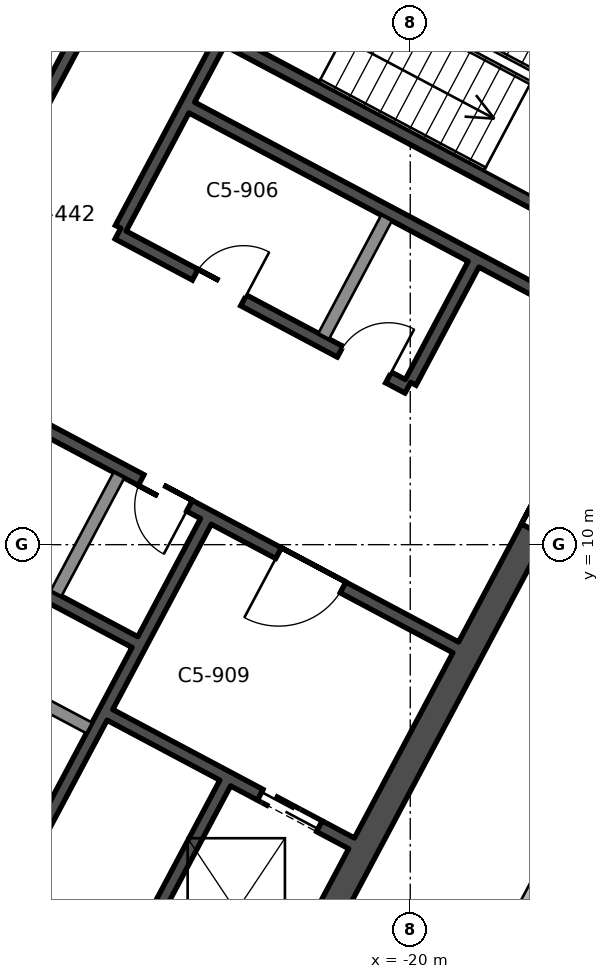
"""IFC4 building model, lengths in metres.
Left out: names, types, materials, properties, quantities, classifications, styles, units other than length and angle.
Written with IfcOpenShell. Run it as: python <this file> out.ifc"""

import sys

from ifc_helpers import new_model, si_unit, direction, frame, frame_2d, origin, place, context, subcontext, project, spatial, rectangle, extrude, element, fill, save


model = new_model("IFC4")
c1 = context("Model", 3, precision=1e-05, world=origin(), true_north=direction((0.0, 1.0)))
c2 = subcontext(c1, "Body", "Model", "MODEL_VIEW")
j1 = project(units=[si_unit("LENGTHUNIT", "METRE"), si_unit("PLANEANGLEUNIT", "RADIAN")], contexts=[c1])
p1 = place(None, origin())
s1 = spatial("IfcSite", under=j1, at=p1, CompositionType="ELEMENT")
p2 = place(p1, origin())
s2 = spatial("IfcBuilding", under=s1, at=p2, CompositionType="ELEMENT")
p3 = place(p2, frame((0.0, 0.0, 345.0)))
s3 = spatial("IfcBuildingStorey", under=s2, at=p3, CompositionType="ELEMENT", Elevation=345.0)
p4 = place(p3, frame((-13.771, 18.138, 0.0), z_axis=(0.0, 0.0, 1.0), x_axis=(-0.469467968382, -0.882949504028, 0.0)))
e1 = element("IfcWall", 1, at=p4, inside=s3, PredefinedType="SHEAR", context=c2, shape_type="SweptSolid", body=[
    extrude(rectangle(XDim=19.1, YDim=0.45, at=frame_2d((9.55, 0.0))), origin(), (0.0, 0.0, 1.0), 4.2),
])
p5 = place(p4, frame((6.55, 0.0, 0.0)))
e2 = element("IfcOpeningElement", 2, at=p5, cuts=e1, PredefinedType="OPENING", context=c2, shape_type="SweptSolid", body=[
    extrude(rectangle(XDim=2.4, YDim=2.4, at=frame_2d((1.2, 1.2))), frame((0.0, 0.235, 0.0), z_axis=(0.0, -1.0, 0.0), x_axis=(1.0, 0.0, 0.0)), (0.0, 0.0, 1.0), 0.47),
])
p6 = place(p3, frame((-14.076, 18.045, 0.0), z_axis=(0.0, 0.0, 1.0), x_axis=(-0.882947755831, 0.46947125628, 0.0)))
e3 = element("IfcWall", 3, at=p6, inside=s3, PredefinedType="SHEAR", context=c2, shape_type="SweptSolid", body=[
    extrude(rectangle(XDim=20.2, YDim=0.45, at=frame_2d((10.1, 0.0))), origin(), (0.0, 0.0, 1.0), 4.2),
])
p7 = place(p3, frame((-22.832, 1.578, 0.0), z_axis=(0.0, 0.0, 1.0), x_axis=(-0.88294509198, 0.469476266226, 0.0)))
e4 = element("IfcWall", 4, at=p7, inside=s3, PredefinedType="SHEAR", context=c2, shape_type="SweptSolid", body=[
    extrude(rectangle(XDim=20.2, YDim=0.45, at=frame_2d((10.1, 0.0))), origin(), (0.0, 0.0, 1.0), 4.2),
])
p8 = place(p3, frame((-23.043, 6.08, 0.0), z_axis=(0.0, 0.0, 1.0), x_axis=(-0.469494272526, -0.882935517501, 0.0)))
e5 = element("IfcWall", 5, at=p8, inside=s3, PredefinedType="SHEAR", context=c2, shape_type="SweptSolid", body=[
    extrude(rectangle(XDim=3.65, YDim=0.2, at=frame_2d((1.825, 0.0))), origin(), (0.0, 0.0, 1.0), 4.2),
])
p9 = place(p3, frame((-18.96, 14.611, 0.0), z_axis=(0.0, 0.0, 1.0), x_axis=(-0.4694473164, -0.882960484464, 0.0)))
e6 = element("IfcWall", 6, at=p9, inside=s3, PredefinedType="SHEAR", context=c2, shape_type="SweptSolid", body=[
    extrude(rectangle(XDim=2.2, YDim=0.2, at=frame_2d((1.1, 0.0))), origin(), (0.0, 0.0, 1.0), 4.2),
])
p10 = place(p3, frame((-20.39, 15.372, 0.0), z_axis=(0.0, 0.0, 1.0), x_axis=(-0.4694473164, -0.882960484464, 0.0)))
e7 = element("IfcWall", 7, at=p10, inside=s3, PredefinedType="SOLIDWALL", context=c2, shape_type="SweptSolid", body=[
    extrude(rectangle(XDim=2.2, YDim=0.2, at=frame_2d((1.1, 0.0))), origin(), (0.0, 0.0, 1.0), 4.2),
])
p11 = place(p3, frame((-23.36, 10.382, 0.0), z_axis=(0.0, 0.0, 1.0), x_axis=(-0.469480409012, -0.88294288918, 0.0)))
e8 = element("IfcWall", 8, at=p11, inside=s3, PredefinedType="SHEAR", context=c2, shape_type="SweptSolid", body=[
    extrude(rectangle(XDim=7.3, YDim=0.2, at=frame_2d((3.65, 0.0))), origin(), (0.0, 0.0, 1.0), 4.2),
])
p12 = place(p3, frame((-24.791, 11.143, 0.0), z_axis=(0.0, 0.0, 1.0), x_axis=(-0.469487830541, -0.882938942948, 0.0)))
e9 = element("IfcWall", 9, at=p12, inside=s3, PredefinedType="SOLIDWALL", context=c2, shape_type="SweptSolid", body=[
    extrude(rectangle(XDim=2.2, YDim=0.2, at=frame_2d((1.1, 0.0))), origin(), (0.0, 0.0, 1.0), 4.2),
])
p13 = place(p3, frame((-21.333, 21.649, 0.0), z_axis=(0.0, 0.0, 1.0), x_axis=(-0.469494272526, -0.882935517501, 0.0)))
e10 = element("IfcWall", 10, at=p13, inside=s3, PredefinedType="SHEAR", context=c2, shape_type="SweptSolid", body=[
    extrude(rectangle(XDim=7.3, YDim=0.2, at=frame_2d((3.65, 0.0))), origin(), (0.0, 0.0, 1.0), 4.2),
])
p14 = place(p13, frame((1.3, 0.0, 0.0)))
e11 = element("IfcOpeningElement", 11, at=p14, cuts=e10, PredefinedType="OPENING", context=c2, shape_type="SweptSolid", body=[
    extrude(rectangle(XDim=1.2, YDim=2.1, at=frame_2d((0.6, 1.05))), frame((0.0, 0.11, 0.0), z_axis=(0.0, -1.0, 0.0), x_axis=(1.0, 0.0, 0.0)), (0.0, 0.0, 1.0), 0.22),
])
p15 = place(p3, frame((-23.188, 22.635, 0.0), z_axis=(0.0, 0.0, 1.0), x_axis=(-0.469454336211, -0.882956752176, 0.0)))
e12 = element("IfcWall", 12, at=p15, inside=s3, PredefinedType="SHEAR", context=c2, shape_type="SweptSolid", body=[
    extrude(rectangle(XDim=7.3, YDim=0.2, at=frame_2d((3.65, 0.0))), origin(), (0.0, 0.0, 1.0), 4.2),
])
p16 = place(p15, frame((0.4, 0.0, 0.0)))
e13 = element("IfcOpeningElement", 13, at=p16, cuts=e12, PredefinedType="OPENING", context=c2, shape_type="SweptSolid", body=[
    extrude(rectangle(XDim=0.9, YDim=2.1, at=frame_2d((0.45, 1.05))), frame((0.0, 0.11, 0.0), z_axis=(0.0, -1.0, 0.0), x_axis=(1.0, 0.0, 0.0)), (0.0, 0.0, 1.0), 0.22),
])
p17 = place(p15, frame((2.1, 0.0, 0.0)))
e14 = element("IfcOpeningElement", 14, at=p17, cuts=e12, PredefinedType="OPENING", context=c2, shape_type="SweptSolid", body=[
    extrude(rectangle(XDim=0.9, YDim=2.1, at=frame_2d((0.45, 1.05))), frame((0.0, 0.11, 0.0), z_axis=(0.0, -1.0, 0.0), x_axis=(1.0, 0.0, 0.0)), (0.0, 0.0, 1.0), 0.22),
])
p18 = place(p15, frame((3.75, 0.0, 0.0)))
e15 = element("IfcOpeningElement", 15, at=p18, cuts=e12, PredefinedType="OPENING", context=c2, shape_type="SweptSolid", body=[
    extrude(rectangle(XDim=0.9, YDim=2.1, at=frame_2d((0.45, 1.05))), frame((0.0, 0.11, 0.0), z_axis=(0.0, -1.0, 0.0), x_axis=(1.0, 0.0, 0.0)), (0.0, 0.0, 1.0), 0.22),
])
p19 = place(p3, frame((-15.942, 14.536, 0.0), z_axis=(0.0, 0.0, 1.0), x_axis=(-0.882946947542, 0.469472776449, 0.0)))
e16 = element("IfcWall", 16, at=p19, inside=s3, PredefinedType="SHEAR", context=c2, shape_type="SweptSolid", body=[
    extrude(rectangle(XDim=8.0, YDim=0.2, at=frame_2d((4.0, 0.0))), origin(), (0.0, 0.0, 1.0), 4.2),
])
p20 = place(p3, frame((-16.529, 13.432, 0.0), z_axis=(0.0, 0.0, 1.0), x_axis=(-0.88295287151, 0.469461634952, 0.0)))
e17 = element("IfcWall", 17, at=p20, inside=s3, PredefinedType="SHEAR", context=c2, shape_type="SweptSolid", body=[
    extrude(rectangle(XDim=8.0, YDim=0.2, at=frame_2d((4.0, 0.0))), origin(), (0.0, 0.0, 1.0), 4.2),
])
p21 = place(p3, frame((-20.04, 12.581, 0.0), z_axis=(0.0, 0.0, 1.0), x_axis=(-0.882942972946, 0.469480251476, 0.0)))
e18 = element("IfcWall", 18, at=p21, inside=s3, PredefinedType="SHEAR", context=c2, shape_type="SweptSolid", body=[
    extrude(rectangle(XDim=5.4, YDim=0.2, at=frame_2d((2.7, 0.0))), origin(), (0.0, 0.0, 1.0), 4.2),
])
p22 = place(p21, frame((0.36, 0.0, 0.0)))
e19 = element("IfcOpeningElement", 19, at=p22, cuts=e18, PredefinedType="OPENING", context=c2, shape_type="SweptSolid", body=[
    extrude(rectangle(XDim=0.9, YDim=2.1, at=frame_2d((0.45, 1.05))), frame((0.0, 0.11, 0.0), z_axis=(0.0, -1.0, 0.0), x_axis=(1.0, 0.0, 0.0)), (0.0, 0.0, 1.0), 0.22),
])
p23 = place(p21, frame((3.06, 0.0, 0.0)))
e20 = element("IfcOpeningElement", 20, at=p23, cuts=e18, PredefinedType="OPENING", context=c2, shape_type="SweptSolid", body=[
    extrude(rectangle(XDim=0.9, YDim=2.1, at=frame_2d((0.45, 1.05))), frame((0.0, 0.11, 0.0), z_axis=(0.0, -1.0, 0.0), x_axis=(1.0, 0.0, 0.0)), (0.0, 0.0, 1.0), 0.22),
])
p24 = place(p3, frame((-19.252, 8.311, 0.0), z_axis=(0.0, 0.0, 1.0), x_axis=(-0.882955722218, 0.469456273365, 0.0)))
e21 = element("IfcWall", 21, at=p24, inside=s3, PredefinedType="SHEAR", context=c2, shape_type="SweptSolid", body=[
    extrude(rectangle(XDim=10.0, YDim=0.2, at=frame_2d((5.0, 0.0))), origin(), (0.0, 0.0, 1.0), 4.2),
])
p25 = place(p24, frame((2.1, 0.0, 0.0)))
e22 = element("IfcOpeningElement", 22, at=p25, cuts=e21, PredefinedType="OPENING", context=c2, shape_type="SweptSolid", body=[
    extrude(rectangle(XDim=1.2, YDim=2.1, at=frame_2d((0.6, 1.05))), frame((0.0, 0.11, 0.0), z_axis=(0.0, -1.0, 0.0), x_axis=(1.0, 0.0, 0.0)), (0.0, 0.0, 1.0), 0.22),
])
p26 = place(p24, frame((4.96, 0.0, 0.0)))
e23 = element("IfcOpeningElement", 23, at=p26, cuts=e21, PredefinedType="OPENING", context=c2, shape_type="SweptSolid", body=[
    extrude(rectangle(XDim=0.9, YDim=2.1, at=frame_2d((0.45, 1.05))), frame((0.0, 0.11, 0.0), z_axis=(0.0, -1.0, 0.0), x_axis=(1.0, 0.0, 0.0)), (0.0, 0.0, 1.0), 0.22),
])
p27 = place(p24, frame((7.66, 0.0, 0.0)))
e24 = element("IfcOpeningElement", 24, at=p27, cuts=e21, PredefinedType="OPENING", context=c2, shape_type="SweptSolid", body=[
    extrude(rectangle(XDim=0.9, YDim=2.1, at=frame_2d((0.45, 1.05))), frame((0.0, 0.11, 0.0), z_axis=(0.0, -1.0, 0.0), x_axis=(1.0, 0.0, 0.0)), (0.0, 0.0, 1.0), 0.22),
])
p28 = place(p3, frame((-24.528, 8.398, 0.0), z_axis=(0.0, 0.0, 1.0), x_axis=(-0.882953967957, 0.469459572775, 0.0)))
e25 = element("IfcWall", 25, at=p28, inside=s3, PredefinedType="SHEAR", context=c2, shape_type="SweptSolid", body=[
    extrude(rectangle(XDim=5.2, YDim=0.2, at=frame_2d((2.6, 0.0))), origin(), (0.0, 0.0, 1.0), 4.2),
])
p29 = place(p3, frame((-20.965, 5.088, 0.0), z_axis=(0.0, 0.0, 1.0), x_axis=(-0.882925986334, 0.469512196493, 0.0)))
e26 = element("IfcWall", 26, at=p29, inside=s3, PredefinedType="SHEAR", context=c2, shape_type="SweptSolid", body=[
    extrude(rectangle(XDim=4.5, YDim=0.2, at=frame_2d((2.25, 0.0))), origin(), (0.0, 0.0, 1.0), 4.2),
])
p30 = place(p29, frame((0.6, 0.0, 0.0)))
e27 = element("IfcOpeningElement", 27, at=p30, cuts=e26, PredefinedType="OPENING", context=c2, shape_type="SweptSolid", body=[
    extrude(rectangle(XDim=1.1, YDim=2.1, at=frame_2d((0.55, 1.05))), frame((0.0, 0.11, 0.0), z_axis=(0.0, -1.0, 0.0), x_axis=(1.0, 0.0, 0.0)), (0.0, 0.0, 1.0), 0.22),
])
p31 = place(p3, frame((-25.28, 6.986, 0.0), z_axis=(0.0, 0.0, 1.0), x_axis=(-0.882934506056, 0.469496174655, 0.0)))
e28 = element("IfcWall", 28, at=p31, inside=s3, PredefinedType="SOLIDWALL", context=c2, shape_type="SweptSolid", body=[
    extrude(rectangle(XDim=5.2, YDim=0.2, at=frame_2d((2.6, 0.0))), origin(), (0.0, 0.0, 1.0), 4.2),
])
p32 = place(p3, frame((-10.218, 18.911, 0.0), z_axis=(0.0, 0.0, 1.0), x_axis=(-0.469468702847, -0.882949113509, 0.0)))
e29 = element("IfcWall", 29, at=p32, inside=s3, PredefinedType="PARTITIONING", context=c2, shape_type="SweptSolid", body=[
    extrude(rectangle(XDim=23.8, YDim=0.2, at=frame_2d((11.9, 0.0))), origin(), (0.0, 0.0, 1.0), 3.8),
])
p33 = place(p32, frame((11.4, 0.0, 0.0)))
e30 = element("IfcOpeningElement", 30, at=p33, cuts=e29, PredefinedType="OPENING", context=c2, shape_type="SweptSolid", body=[
    extrude(rectangle(XDim=1.0, YDim=2.1, at=frame_2d((0.5, 1.05))), frame((0.0, 0.11, 0.0), z_axis=(0.0, -1.0, 0.0), x_axis=(1.0, 0.0, 0.0)), (0.0, 0.0, 1.0), 0.22),
])
p34 = place(p25, origin())
e31 = element("IfcDoor", 31, at=p34, inside=s3, OperationType="SINGLE_SWING_RIGHT", PredefinedType="DOOR", context=c2, shape_type="SweptSolid", body=[
    extrude(rectangle(XDim=1.2, YDim=2.1, at=frame_2d((0.6, 1.05))), frame((0.0, 0.025, 0.0), z_axis=(0.0, -1.0, 0.0), x_axis=(1.0, 0.0, 0.0)), (0.0, 0.0, 1.0), 0.05),
])
fill(e22, e31)
p35 = place(p26, origin())
e32 = element("IfcDoor", 32, at=p35, inside=s3, OperationType="SINGLE_SWING_LEFT", PredefinedType="DOOR", context=c2, shape_type="SweptSolid", body=[
    extrude(rectangle(XDim=0.9, YDim=2.1, at=frame_2d((0.45, 1.05))), frame((0.0, 0.025, 0.0), z_axis=(0.0, -1.0, 0.0), x_axis=(1.0, 0.0, 0.0)), (0.0, 0.0, 1.0), 0.05),
])
fill(e23, e32)
p36 = place(p22, frame((0.9, 0.0, 0.0), z_axis=(0.0, 0.0, 1.0), x_axis=(-1.0, 0.0, 0.0)))
e33 = element("IfcDoor", 33, at=p36, inside=s3, OperationType="SINGLE_SWING_RIGHT", PredefinedType="DOOR", context=c2, shape_type="SweptSolid", body=[
    extrude(rectangle(XDim=0.9, YDim=2.1, at=frame_2d((0.45, 1.05))), frame((0.0, 0.025, 0.0), z_axis=(0.0, -1.0, 0.0), x_axis=(1.0, 0.0, 0.0)), (0.0, 0.0, 1.0), 0.05),
])
fill(e19, e33)
p37 = place(p23, frame((0.9, 0.0, 0.0), z_axis=(0.0, 0.0, 1.0), x_axis=(-1.0, 0.0, 0.0)))
e34 = element("IfcDoor", 34, at=p37, inside=s3, OperationType="SINGLE_SWING_RIGHT", PredefinedType="DOOR", context=c2, shape_type="SweptSolid", body=[
    extrude(rectangle(XDim=0.9, YDim=2.1, at=frame_2d((0.45, 1.05))), frame((0.0, 0.025, 0.0), z_axis=(0.0, -1.0, 0.0), x_axis=(1.0, 0.0, 0.0)), (0.0, 0.0, 1.0), 0.05),
])
fill(e20, e34)
p38 = place(p30, origin())
e35 = element("IfcDoor", 35, at=p38, inside=s3, OperationType="DOUBLE_DOOR_SLIDING", PredefinedType="DOOR", context=c2, shape_type="SweptSolid", body=[
    extrude(rectangle(XDim=1.1, YDim=2.1, at=frame_2d((0.55, 1.05))), frame((0.0, 0.025, 0.0), z_axis=(0.0, -1.0, 0.0), x_axis=(1.0, 0.0, 0.0)), (0.0, 0.0, 1.0), 0.05),
])
fill(e27, e35)
save(model, sys.argv[1])
